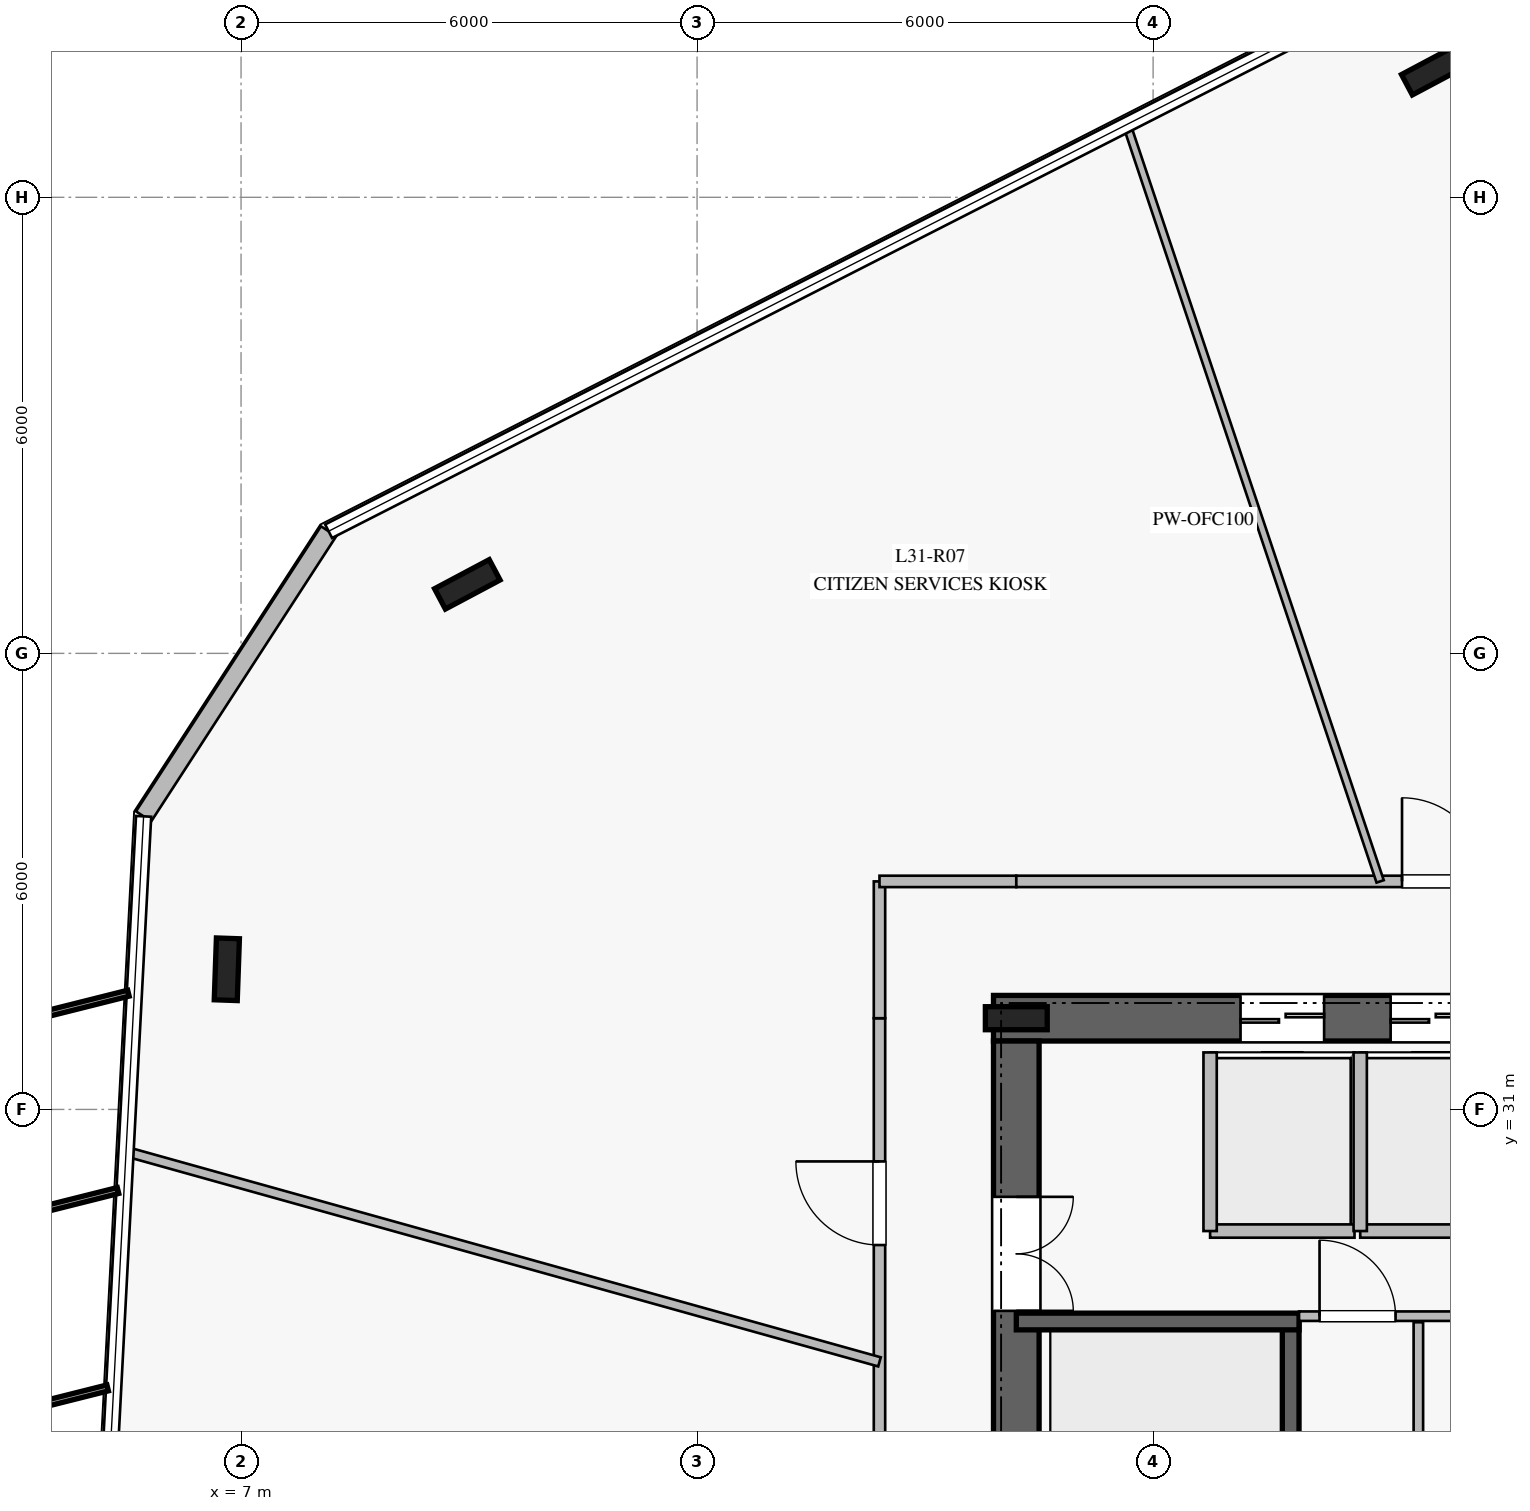
"""IFC4 building model, lengths in metres.
Left out: names, types, materials, properties, quantities, classifications, styles, units other than length and angle.
Written with IfcOpenShell. Run it as: python <this file> out.ifc"""

import sys

from ifc_helpers import new_model, si_unit, direction, frame, frame_2d, origin, origin_2d, place, context, subcontext, project, spatial, rectangle, i_section, extrude, element, fill, save


model = new_model("IFC4")
c1 = context("Model", 3, precision=1e-05, world=origin(), true_north=direction((0.0, 1.0)))
c2 = subcontext(c1, "Body", "Model", "MODEL_VIEW")
j1 = project(units=[si_unit("LENGTHUNIT", "METRE"), si_unit("PLANEANGLEUNIT", "RADIAN")], contexts=[c1])
p1 = place(None, origin())
s1 = spatial("IfcSite", under=j1, at=p1, CompositionType="ELEMENT")
p2 = place(p1, origin())
s2 = spatial("IfcBuilding", under=s1, at=p2, CompositionType="ELEMENT")
p3 = place(p2, frame((0.0, 0.0, 130.4)))
s3 = spatial("IfcBuildingStorey", under=s2, at=p3, CompositionType="ELEMENT", Elevation=130.4)
p4 = place(p3, frame((33.1, 32.2, 0.0), z_axis=(0.0, 0.0, 1.0), x_axis=(-1.0, 0.0, 0.0)))
e1 = element("IfcWall", 1, at=p4, inside=s3, PredefinedType="SHEAR", context=c2, shape_type="SweptSolid", body=[
    extrude(rectangle(XDim=16.2, YDim=0.6, at=frame_2d((8.1, 0.0))), origin(), (0.0, 0.0, 1.0), 3.76),
])
p5 = place(p4, frame((5.05, 0.0, 0.0)))
e2 = element("IfcOpeningElement", 2, at=p5, cuts=e1, PredefinedType="OPENING", context=c2, shape_type="SweptSolid", body=[
    extrude(rectangle(XDim=1.2, YDim=2.25, at=frame_2d((0.6, 1.125))), frame((0.0, 0.31, 0.0), z_axis=(0.0, -1.0, 0.0), x_axis=(1.0, 0.0, 0.0)), (0.0, 0.0, 1.0), 0.62),
])
p6 = place(p4, frame((11.85, 0.0, 0.0)))
e3 = element("IfcOpeningElement", 3, at=p6, cuts=e1, PredefinedType="OPENING", context=c2, shape_type="SweptSolid", body=[
    extrude(rectangle(XDim=1.1, YDim=2.2, at=frame_2d((0.55, 1.1))), frame((0.0, 0.31, 0.0), z_axis=(0.0, -1.0, 0.0), x_axis=(1.0, 0.0, 0.0)), (0.0, 0.0, 1.0), 0.62),
])
p7 = place(p4, frame((9.875, 0.0, 0.0)))
e4 = element("IfcOpeningElement", 4, at=p7, cuts=e1, PredefinedType="OPENING", context=c2, shape_type="SweptSolid", body=[
    extrude(rectangle(XDim=1.1, YDim=2.2, at=frame_2d((0.55, 1.1))), frame((0.0, 0.31, 0.0), z_axis=(0.0, -1.0, 0.0), x_axis=(1.0, 0.0, 0.0)), (0.0, 0.0, 1.0), 0.62),
])
p8 = place(p4, frame((7.9, 0.0, 0.0)))
e5 = element("IfcOpeningElement", 5, at=p8, cuts=e1, PredefinedType="OPENING", context=c2, shape_type="SweptSolid", body=[
    extrude(rectangle(XDim=1.1, YDim=2.2, at=frame_2d((0.55, 1.1))), frame((0.0, 0.31, 0.0), z_axis=(0.0, -1.0, 0.0), x_axis=(1.0, 0.0, 0.0)), (0.0, 0.0, 1.0), 0.62),
])
p9 = place(p3, frame((17.2, 31.9, 0.0), z_axis=(0.0, 0.0, 1.0), x_axis=(0.0, -1.0, 0.0)))
e6 = element("IfcWall", 6, at=p9, inside=s3, PredefinedType="SHEAR", context=c2, shape_type="SweptSolid", body=[
    extrude(rectangle(XDim=13.8, YDim=0.6, at=frame_2d((6.9, 0.0))), origin(), (0.0, 0.0, 1.0), 3.76),
])
p10 = place(p9, frame((2.05, 0.0, 0.0)))
e7 = element("IfcOpeningElement", 7, at=p10, cuts=e6, PredefinedType="OPENING", context=c2, shape_type="SweptSolid", body=[
    extrude(rectangle(XDim=1.5, YDim=2.2, at=frame_2d((0.75, 1.1))), frame((0.0, 0.31, 0.0), z_axis=(0.0, -1.0, 0.0), x_axis=(1.0, 0.0, 0.0)), (0.0, 0.0, 1.0), 0.62),
])
p11 = place(p3, frame((17.2, 32.2, 0.0), z_axis=(0.0, 0.0, 1.0), x_axis=(1.0, 0.0, 0.0)))
e8 = element("IfcColumn", 8, at=p11, inside=s3, PredefinedType="COLUMN", context=c2, shape_type="SweptSolid", body=[
    extrude(i_section(OverallWidth=0.303, OverallDepth=0.814, WebThickness=0.021, FlangeThickness=0.04, at=origin_2d()), origin(), (0.0, 0.0, 1.0), 4.0),
])
p12 = place(p3, frame((20.81, 20.99, 0.0), z_axis=(0.0, 0.0, 1.0), x_axis=(0.0, 1.0, 0.0)))
e9 = element("IfcWall", 9, at=p12, inside=s3, PredefinedType="SOLIDWALL", context=c2, shape_type="SweptSolid", body=[
    extrude(rectangle(XDim=7.22, YDim=0.22, at=frame_2d((3.61, 0.0))), origin(), (0.0, 0.0, 1.0), 3.76),
])
p13 = place(p12, frame((0.18, 0.0, 0.0)))
e10 = element("IfcOpeningElement", 10, at=p13, cuts=e9, PredefinedType="OPENING", context=c2, shape_type="SweptSolid", body=[
    extrude(rectangle(XDim=1.15, YDim=2.2, at=frame_2d((0.575, 1.1))), frame((0.0, 0.12, 0.0), z_axis=(0.0, -1.0, 0.0), x_axis=(1.0, 0.0, 0.0)), (0.0, 0.0, 1.0), 0.24),
])
p14 = place(p3, frame((17.2, 28.21, 0.0), z_axis=(0.0, 0.0, 1.0), x_axis=(1.0, 0.0, 0.0)))
e11 = element("IfcWall", 11, at=p14, inside=s3, PredefinedType="SOLIDWALL", context=c2, shape_type="SweptSolid", body=[
    extrude(rectangle(XDim=3.72, YDim=0.22, at=frame_2d((1.86, 0.0))), origin(), (0.0, 0.0, 1.0), 3.76),
])
for number, where, z_axis, x_axis in (
    (12, (22.699, 44.672, 0.0), (0.0, 0.0, 1.0), (0.883, 0.469, 0.0)),
    (13, (9.977, 37.908, 0.0), (0.0, 0.0, 1.0), (0.883, 0.469, 0.0)),
    (14, (6.813, 32.844, 0.0), (0.0, 0.0, 1.0), (0.035, 0.999, 0.0)),
):
    element("IfcColumn", number, at=place(p3, frame(where, z_axis=z_axis, x_axis=x_axis)), inside=s3, PredefinedType="COLUMN", context=c2, shape_type="SweptSolid", body=[
        extrude(i_section(OverallWidth=0.303, OverallDepth=0.814, WebThickness=0.021, FlangeThickness=0.04, at=origin_2d()), origin(), (0.0, 0.0, 1.0), 4.0),
    ])
p15 = place(p3, frame((8.152, 38.607, 0.0), z_axis=(0.0, 0.0, 1.0), x_axis=(-0.544351046129, -0.838857519832, 0.0)))
e15 = element("IfcWall", 15, at=p15, inside=s3, PredefinedType="STANDARD", context=c2, shape_type="SweptSolid", body=[
    extrude(rectangle(XDim=4.471, YDim=0.24, at=frame_2d((2.236, 0.0))), origin(), (0.0, 0.0, 1.0), 3.76),
])
p16 = place(p3, frame((20.92, 28.28, 0.0), z_axis=(0.0, 0.0, 1.0), x_axis=(1.0, 0.0, 0.0)))
e16 = element("IfcWall", 16, at=p16, inside=s3, PredefinedType="PARTITIONING", context=c2, shape_type="SweptSolid", body=[
    extrude(rectangle(XDim=3.405, YDim=0.125, at=frame_2d((1.703, 0.0))), origin(), (0.0, 0.0, 1.0), 3.76),
])
p17 = place(p16, frame((0.27, 0.0, 0.0)))
e17 = element("IfcOpeningElement", 17, at=p17, cuts=e16, PredefinedType="OPENING", context=c2, shape_type="SweptSolid", body=[
    extrude(rectangle(XDim=1.0, YDim=2.15, at=frame_2d((0.5, 1.075))), frame((0.0, 0.073, 0.0), z_axis=(0.0, -1.0, 0.0), x_axis=(1.0, 0.0, 0.0)), (0.0, 0.0, 1.0), 0.145),
])
p18 = place(p3, frame((22.49, 24.97, 0.0), z_axis=(0.0, 0.0, 1.0), x_axis=(0.0, 1.0, 0.0)))
e18 = element("IfcWall", 18, at=p18, inside=s3, PredefinedType="PARTITIONING", context=c2, shape_type="SweptSolid", body=[
    extrude(rectangle(XDim=3.23, YDim=0.125, at=frame_2d((1.615, 0.0))), origin(), (0.0, 0.0, 1.0), 3.76),
])
p19 = place(p3, frame((19.75, 29.4, 0.0), z_axis=(0.0, 0.0, 1.0), x_axis=(1.0, 0.0, 0.0)))
e19 = element("IfcWall", 19, at=p19, inside=s3, PredefinedType="PARTITIONING", context=c2, shape_type="SweptSolid", body=[
    extrude(rectangle(XDim=1.9, YDim=0.175, at=frame_2d((0.95, 0.0))), origin(), (0.0, 0.0, 1.0), 3.76),
])
p20 = place(p3, frame((19.75, 29.4, 0.0), z_axis=(0.0, 0.0, 1.0), x_axis=(0.0, 1.0, 0.0)))
e20 = element("IfcWall", 20, at=p20, inside=s3, PredefinedType="PARTITIONING", context=c2, shape_type="SweptSolid", body=[
    extrude(rectangle(XDim=2.35, YDim=0.175, at=frame_2d((1.175, 0.0))), origin(), (0.0, 0.0, 1.0), 3.76),
])
p21 = place(p3, frame((21.725, 29.4, 0.0), z_axis=(0.0, 0.0, 1.0), x_axis=(1.0, 0.0, 0.0)))
e21 = element("IfcWall", 21, at=p21, inside=s3, PredefinedType="PARTITIONING", context=c2, shape_type="SweptSolid", body=[
    extrude(rectangle(XDim=1.9, YDim=0.175, at=frame_2d((0.95, 0.0))), origin(), (0.0, 0.0, 1.0), 3.76),
])
p22 = place(p3, frame((21.725, 29.4, 0.0), z_axis=(0.0, 0.0, 1.0), x_axis=(0.0, 1.0, 0.0)))
e22 = element("IfcWall", 22, at=p22, inside=s3, PredefinedType="PARTITIONING", context=c2, shape_type="SweptSolid", body=[
    extrude(rectangle(XDim=2.35, YDim=0.175, at=frame_2d((1.175, 0.0))), origin(), (0.0, 0.0, 1.0), 3.76),
])
p23 = place(p3, frame((15.4, 25.95, 0.0), z_axis=(0.0, 0.0, 1.0), x_axis=(0.0, 1.0, 0.0)))
e23 = element("IfcWall", 23, at=p23, inside=s3, PredefinedType="PARTITIONING", context=c2, shape_type="SweptSolid", body=[
    extrude(rectangle(XDim=6.25, YDim=0.15, at=frame_2d((3.125, 0.0))), origin(), (0.0, 0.0, 1.0), 3.21),
])
p24 = place(p23, frame((3.266, 0.0, 0.0)))
e24 = element("IfcOpeningElement", 24, at=p24, cuts=e23, PredefinedType="OPENING", context=c2, shape_type="SweptSolid", body=[
    extrude(rectangle(XDim=1.1, YDim=2.2, at=frame_2d((0.55, 1.1))), frame((0.0, 0.085, 0.0), z_axis=(0.0, -1.0, 0.0), x_axis=(1.0, 0.0, 0.0)), (0.0, 0.0, 1.0), 0.17),
])
p25 = place(p3, frame((15.4, 32.2, 0.0), z_axis=(0.0, 0.0, 1.0), x_axis=(0.0, 1.0, 0.0)))
e25 = element("IfcWall", 25, at=p25, inside=s3, PredefinedType="PARTITIONING", context=c2, shape_type="SweptSolid", body=[
    extrude(rectangle(XDim=1.8, YDim=0.15, at=frame_2d((0.9, 0.0))), origin(), (0.0, 0.0, 1.0), 3.21),
])
p26 = place(p3, frame((15.4, 34.0, 0.0), z_axis=(0.0, 0.0, 1.0), x_axis=(1.0, 0.0, 0.0)))
e26 = element("IfcWall", 26, at=p26, inside=s3, PredefinedType="PARTITIONING", context=c2, shape_type="SweptSolid", body=[
    extrude(rectangle(XDim=1.8, YDim=0.15, at=frame_2d((0.9, 0.0))), origin(), (0.0, 0.0, 1.0), 3.76),
])
p27 = place(p3, frame((17.2, 34.0, 0.0), z_axis=(0.0, 0.0, 1.0), x_axis=(1.0, 0.0, 0.0)))
e27 = element("IfcWall", 27, at=p27, inside=s3, PredefinedType="PARTITIONING", context=c2, shape_type="SweptSolid", body=[
    extrude(rectangle(XDim=6.85, YDim=0.15, at=frame_2d((3.425, 0.0))), origin(), (0.0, 0.0, 1.0), 3.21),
])
p28 = place(p27, frame((5.075, 0.0, 0.0)))
e28 = element("IfcOpeningElement", 28, at=p28, cuts=e27, PredefinedType="OPENING", context=c2, shape_type="SweptSolid", body=[
    extrude(rectangle(XDim=1.1, YDim=2.2, at=frame_2d((0.55, 1.1))), frame((0.0, 0.085, 0.0), z_axis=(0.0, -1.0, 0.0), x_axis=(1.0, 0.0, 0.0)), (0.0, 0.0, 1.0), 0.17),
])
p29 = place(p3, frame((21.987, 34.0, 0.0), z_axis=(0.0, 0.0, 1.0), x_axis=(-0.317554871219, 0.948239897792, 0.0)))
e29 = element("IfcWall", 29, at=p29, inside=s3, PredefinedType="MOVABLE", context=c2, shape_type="SweptSolid", body=[
    extrude(rectangle(XDim=10.484, YDim=0.1, at=frame_2d((5.242, 0.0))), origin(), (0.0, 0.0, 1.0), 3.16),
])
p30 = place(p3, frame((15.4, 27.679, 0.0), z_axis=(0.0, 0.0, 1.0), x_axis=(-0.963195872144, 0.268800505737, 0.0)))
e30 = element("IfcWall", 30, at=p30, inside=s3, PredefinedType="PARTITIONING", context=c2, shape_type="SweptSolid", body=[
    extrude(rectangle(XDim=10.275, YDim=0.125, at=frame_2d((5.138, 0.0))), origin(), (0.0, 0.0, 1.0), 3.02),
])
p31 = place(p10, origin())
e31 = element("IfcDoor", 31, at=p31, inside=s3, OperationType="DOUBLE_DOOR_SINGLE_SWING", PredefinedType="DOOR", context=c2, shape_type="SweptSolid", body=[
    extrude(rectangle(XDim=1.5, YDim=2.2, at=frame_2d((0.75, 1.1))), frame((0.0, 0.025, 0.0), z_axis=(0.0, -1.0, 0.0), x_axis=(1.0, 0.0, 0.0)), (0.0, 0.0, 1.0), 0.05),
])
fill(e7, e31)
p32 = place(p17, origin())
e32 = element("IfcDoor", 32, at=p32, inside=s3, OperationType="SINGLE_SWING_LEFT", PredefinedType="DOOR", context=c2, shape_type="SweptSolid", body=[
    extrude(rectangle(XDim=1.0, YDim=2.15, at=frame_2d((0.5, 1.075))), frame((0.0, 0.025, 0.0), z_axis=(0.0, -1.0, 0.0), x_axis=(1.0, 0.0, 0.0)), (0.0, 0.0, 1.0), 0.05),
])
fill(e17, e32)
p33 = place(p6, origin())
e33 = element("IfcDoor", 33, at=p33, inside=s3, OperationType="DOUBLE_DOOR_SLIDING", PredefinedType="DOOR", context=c2, shape_type="SweptSolid", body=[
    extrude(rectangle(XDim=1.1, YDim=2.2, at=frame_2d((0.55, 1.1))), frame((0.0, 0.025, 0.0), z_axis=(0.0, -1.0, 0.0), x_axis=(1.0, 0.0, 0.0)), (0.0, 0.0, 1.0), 0.05),
])
fill(e3, e33)
p34 = place(p7, origin())
e34 = element("IfcDoor", 34, at=p34, inside=s3, OperationType="DOUBLE_DOOR_SLIDING", PredefinedType="DOOR", context=c2, shape_type="SweptSolid", body=[
    extrude(rectangle(XDim=1.1, YDim=2.2, at=frame_2d((0.55, 1.1))), frame((0.0, 0.025, 0.0), z_axis=(0.0, -1.0, 0.0), x_axis=(1.0, 0.0, 0.0)), (0.0, 0.0, 1.0), 0.05),
])
fill(e4, e34)
p35 = place(p28, origin())
e35 = element("IfcDoor", 35, at=p35, inside=s3, OperationType="SINGLE_SWING_LEFT", PredefinedType="DOOR", context=c2, shape_type="SweptSolid", body=[
    extrude(rectangle(XDim=1.1, YDim=2.2, at=frame_2d((0.55, 1.1))), frame((0.0, 0.025, 0.0), z_axis=(0.0, -1.0, 0.0), x_axis=(1.0, 0.0, 0.0)), (0.0, 0.0, 1.0), 0.05),
])
fill(e28, e35)
p36 = place(p24, origin())
e36 = element("IfcDoor", 36, at=p36, inside=s3, OperationType="SINGLE_SWING_RIGHT", PredefinedType="DOOR", context=c2, shape_type="SweptSolid", body=[
    extrude(rectangle(XDim=1.1, YDim=2.2, at=frame_2d((0.55, 1.1))), frame((0.0, 0.025, 0.0), z_axis=(0.0, -1.0, 0.0), x_axis=(1.0, 0.0, 0.0)), (0.0, 0.0, 1.0), 0.05),
])
fill(e24, e36)
save(model, sys.argv[1])
